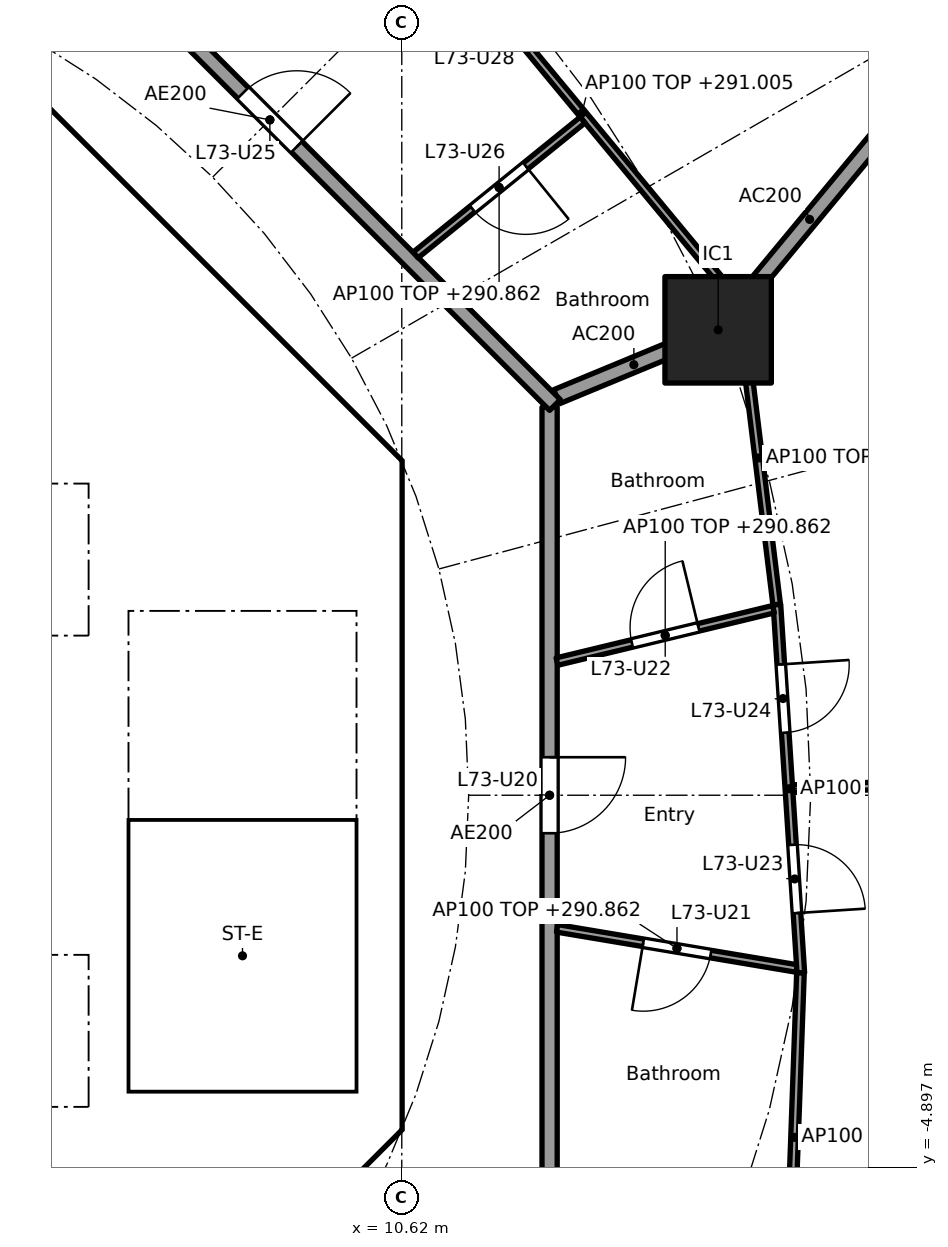
"""IFC4 building model, lengths in metres.
Left out: names, types, materials, properties, quantities, classifications, styles, units other than length and angle.
Written with IfcOpenShell. Run it as: python <this file> out.ifc"""

import sys

from ifc_helpers import new_model, si_unit, direction, frame, frame_2d, origin, origin_2d, place, context, subcontext, project, spatial, polyline, rectangle, outline, extrude, element, fill, save


model = new_model("IFC4")
c1 = context("Model", 3, precision=1e-05, world=origin(), true_north=direction((0.0, 1.0)))
c2 = subcontext(c1, "Body", "Model", "MODEL_VIEW")
j1 = project(units=[si_unit("LENGTHUNIT", "METRE"), si_unit("PLANEANGLEUNIT", "RADIAN")], contexts=[c1])
p1 = place(None, origin())
s1 = spatial("IfcSite", under=j1, at=p1, CompositionType="ELEMENT")
p2 = place(p1, origin())
s2 = spatial("IfcBuilding", under=s1, at=p2, CompositionType="ELEMENT")
p3 = place(p2, frame((0.0, 0.0, 288.1)))
s3 = spatial("IfcBuildingStorey", under=s2, at=p3, CompositionType="ELEMENT", Elevation=288.1)
p4 = place(p3, frame((14.782, 6.123, 0.0), z_axis=(0.0, 0.0, 1.0), x_axis=(1.0, 0.0, 0.0)))
e1 = element("IfcColumn", 1, at=p4, inside=s3, PredefinedType="COLUMN", context=c2, shape_type="SweptSolid", body=[
    extrude(rectangle(XDim=1.4, YDim=1.4, at=origin_2d()), origin(), (0.0, 0.0, 1.0), 3.7),
])
p5 = place(p3, frame((9.988, 4.613, 0.0), z_axis=(0.0, 0.0, 1.0), x_axis=(-0.707106781187, 0.707106781187, 0.0)))
e2 = element("IfcWall", 2, at=p5, inside=s3, PredefinedType="SHEAR", context=c2, shape_type="SweptSolid", body=[
    extrude(rectangle(XDim=7.602, YDim=0.6, at=frame_2d((3.801, 0.0))), origin(), (0.0, 0.0, 1.0), 3.44),
])
p6 = place(p5, frame((3.201, 0.0, 0.0)))
e3 = element("IfcOpeningElement", 3, at=p6, cuts=e2, PredefinedType="OPENING", context=c2, shape_type="SweptSolid", body=[
    extrude(rectangle(XDim=1.2, YDim=2.1, at=frame_2d((0.6, 1.05))), frame((0.0, 0.31, 0.0), z_axis=(0.0, -1.0, 0.0), x_axis=(1.0, 0.0, 0.0)), (0.0, 0.0, 1.0), 0.62),
])
p7 = place(p3, frame((4.613, -9.988, 0.0), z_axis=(0.0, 0.0, 1.0), x_axis=(0.707106781187, 0.707106781187, 0.0)))
e4 = element("IfcWall", 4, at=p7, inside=s3, PredefinedType="SHEAR", context=c2, shape_type="SweptSolid", body=[
    extrude(rectangle(XDim=7.602, YDim=0.6, at=frame_2d((3.801, 0.0))), origin(), (0.0, 0.0, 1.0), 3.44),
])
p8 = place(p7, frame((3.201, 0.0, 0.0)))
e5 = element("IfcOpeningElement", 5, at=p8, cuts=e4, PredefinedType="OPENING", context=c2, shape_type="SweptSolid", body=[
    extrude(rectangle(XDim=1.2, YDim=2.1, at=frame_2d((0.6, 1.05))), frame((0.0, 0.31, 0.0), z_axis=(0.0, -1.0, 0.0), x_axis=(1.0, 0.0, 0.0)), (0.0, 0.0, 1.0), 0.62),
])
p9 = place(p3, frame((-6.7, 2.0, 0.0), z_axis=(0.0, 0.0, 1.0), x_axis=(1.0, 0.0, 0.0)))
e6 = element("IfcWall", 6, at=p9, inside=s3, PredefinedType="SOLIDWALL", context=c2, shape_type="SweptSolid", body=[
    extrude(rectangle(XDim=13.4, YDim=0.2, at=frame_2d((6.7, 0.0))), origin(), (0.0, 0.0, 1.0), 3.44),
])
p10 = place(p9, frame((11.65, 0.0, 0.0)))
e7 = element("IfcOpeningElement", 7, at=p10, cuts=e6, PredefinedType="OPENING", context=c2, shape_type="SweptSolid", body=[
    extrude(rectangle(XDim=1.1, YDim=2.1, at=frame_2d((0.55, 1.05))), frame((0.0, 0.11, 0.0), z_axis=(0.0, -1.0, 0.0), x_axis=(1.0, 0.0, 0.0)), (0.0, 0.0, 1.0), 0.22),
])
p11 = place(p9, frame((2.95, 0.0, 0.0)))
e8 = element("IfcOpeningElement", 8, at=p11, cuts=e6, PredefinedType="OPENING", context=c2, shape_type="SweptSolid", body=[
    extrude(rectangle(XDim=0.9, YDim=2.1, at=frame_2d((0.45, 1.05))), frame((0.0, 0.11, 0.0), z_axis=(0.0, -1.0, 0.0), x_axis=(1.0, 0.0, 0.0)), (0.0, 0.0, 1.0), 0.22),
])
p12 = place(p9, frame((8.45, 0.0, 0.0)))
e9 = element("IfcOpeningElement", 9, at=p12, cuts=e6, PredefinedType="OPENING", context=c2, shape_type="SweptSolid", body=[
    extrude(rectangle(XDim=0.9, YDim=2.1, at=frame_2d((0.45, 1.05))), frame((0.0, 0.11, 0.0), z_axis=(0.0, -1.0, 0.0), x_axis=(1.0, 0.0, 0.0)), (0.0, 0.0, 1.0), 0.22),
])
p13 = place(p3, frame((6.7, 4.0, 0.0), z_axis=(0.0, 0.0, 1.0), x_axis=(1.0, 0.0, 0.0)))
e10 = element("IfcWall", 10, at=p13, inside=s3, PredefinedType="SOLIDWALL", context=c2, shape_type="SweptSolid", body=[
    extrude(rectangle(XDim=3.325, YDim=0.2, at=frame_2d((1.662, 0.0))), origin(), (0.0, 0.0, 1.0), 3.44),
])
p14 = place(p13, frame((1.25, 0.0, 0.0)))
e11 = element("IfcOpeningElement", 11, at=p14, cuts=e10, PredefinedType="OPENING", context=c2, shape_type="SweptSolid", body=[
    extrude(rectangle(XDim=1.1, YDim=2.1, at=frame_2d((0.55, 1.05))), frame((0.0, 0.11, 0.0), z_axis=(0.0, -1.0, 0.0), x_axis=(1.0, 0.0, 0.0)), (0.0, 0.0, 1.0), 0.22),
])
p15 = place(p3, frame((-6.7, -2.0, 0.0), z_axis=(0.0, 0.0, 1.0), x_axis=(1.0, 0.0, 0.0)))
e12 = element("IfcWall", 12, at=p15, inside=s3, PredefinedType="SOLIDWALL", context=c2, shape_type="SweptSolid", body=[
    extrude(rectangle(XDim=13.4, YDim=0.2, at=frame_2d((6.7, 0.0))), origin(), (0.0, 0.0, 1.0), 3.44),
])
p16 = place(p15, frame((9.45, 0.0, 0.0)))
e13 = element("IfcOpeningElement", 13, at=p16, cuts=e12, PredefinedType="OPENING", context=c2, shape_type="SweptSolid", body=[
    extrude(rectangle(XDim=1.1, YDim=2.1, at=frame_2d((0.55, 1.05))), frame((0.0, 0.11, 0.0), z_axis=(0.0, -1.0, 0.0), x_axis=(1.0, 0.0, 0.0)), (0.0, 0.0, 1.0), 0.22),
])
p17 = place(p15, frame((11.65, 0.0, 0.0)))
e14 = element("IfcOpeningElement", 14, at=p17, cuts=e12, PredefinedType="OPENING", context=c2, shape_type="SweptSolid", body=[
    extrude(rectangle(XDim=1.1, YDim=2.1, at=frame_2d((0.55, 1.05))), frame((0.0, 0.11, 0.0), z_axis=(0.0, -1.0, 0.0), x_axis=(1.0, 0.0, 0.0)), (0.0, 0.0, 1.0), 0.22),
])
p18 = place(p15, frame((0.75, 0.0, 0.0)))
e15 = element("IfcOpeningElement", 15, at=p18, cuts=e12, PredefinedType="OPENING", context=c2, shape_type="SweptSolid", body=[
    extrude(rectangle(XDim=0.9, YDim=2.1, at=frame_2d((0.45, 1.05))), frame((0.0, 0.11, 0.0), z_axis=(0.0, -1.0, 0.0), x_axis=(1.0, 0.0, 0.0)), (0.0, 0.0, 1.0), 0.22),
])
p19 = place(p15, frame((2.95, 0.0, 0.0)))
e16 = element("IfcOpeningElement", 16, at=p19, cuts=e12, PredefinedType="OPENING", context=c2, shape_type="SweptSolid", body=[
    extrude(rectangle(XDim=0.9, YDim=2.1, at=frame_2d((0.45, 1.05))), frame((0.0, 0.11, 0.0), z_axis=(0.0, -1.0, 0.0), x_axis=(1.0, 0.0, 0.0)), (0.0, 0.0, 1.0), 0.22),
])
p20 = place(p15, frame((6.25, 0.0, 0.0)))
e17 = element("IfcOpeningElement", 17, at=p20, cuts=e12, PredefinedType="OPENING", context=c2, shape_type="SweptSolid", body=[
    extrude(rectangle(XDim=0.9, YDim=2.1, at=frame_2d((0.45, 1.05))), frame((0.0, 0.11, 0.0), z_axis=(0.0, -1.0, 0.0), x_axis=(1.0, 0.0, 0.0)), (0.0, 0.0, 1.0), 0.22),
])
p21 = place(p3, origin())
e18 = element("IfcWall", 18, at=p21, inside=s3, PredefinedType="SHEAR", context=c2, shape_type="SweptSolid", body=[
    extrude(outline(polyline([(9.776, -4.401), (10.025, -4.152), (10.025, -3.801), (10.025, 4.152), (9.776, 4.401), (10.2, 4.825), (10.625, 4.401), (10.625, -4.401), (10.2, -4.825), (9.776, -4.401)])), origin(), (0.0, 0.0, 1.0), 3.44),
])
p22 = place(p3, origin())
e19 = element("IfcWall", 19, at=p22, inside=s3, PredefinedType="SOLIDWALL", context=c2, shape_type="SweptSolid", body=[
    extrude(outline(polyline([(-6.7, -2.1), (-6.5, -2.1), (-6.5, -4.1), (-4.5, -4.1), (-4.5, -2.1), (-4.3, -2.1), (-4.3, -4.1), (-2.3, -4.1), (-2.3, -2.1), (-2.1, -2.1), (-2.1, -4.1), (2.1, -4.1), (2.1, -2.1), (2.3, -2.1), (2.3, -4.1), (4.3, -4.1), (4.3, -2.1), (4.5, -2.1), (4.5, -4.1), (6.5, -4.1), (6.5, -2.1), (6.7, -2.1), (6.7, -4.3), (-6.7, -4.3), (-6.7, -2.1)])), origin(), (0.0, 0.0, 1.0), 3.44),
])
p23 = place(p3, origin())
e20 = element("IfcWall", 20, at=p23, inside=s3, PredefinedType="SOLIDWALL", context=c2, shape_type="SweptSolid", body=[
    extrude(outline(polyline([(-6.7, 4.3), (6.7, 4.3), (6.7, 2.1), (6.5, 2.1), (6.5, 4.1), (4.5, 4.1), (4.5, 2.1), (4.3, 2.1), (4.3, 4.1), (0.1, 4.1), (0.1, 2.1), (-0.1, 2.1), (-0.1, 4.1), (-6.5, 4.1), (-6.5, 2.1), (-6.7, 2.1), (-6.7, 4.3)])), origin(), (0.0, 0.0, 1.0), 3.44),
])
p24 = place(p3, origin())
e21 = element("IfcWall", 21, at=p24, inside=s3, PredefinedType="SOLIDWALL", context=c2, shape_type="SweptSolid", body=[
    extrude(outline(polyline([(7.025, -3.9), (6.7, -3.9), (6.7, 3.9), (7.025, 3.9), (7.025, -3.9)])), origin(), (0.0, 0.0, 1.0), 3.44),
])
p25 = place(p3, origin())
e22 = element("IfcWall", 22, at=p25, inside=s3, PredefinedType="SOLIDWALL", context=c2, shape_type="SweptSolid", body=[
    extrude(outline(polyline([(10.025, -4.1), (6.7, -4.1), (6.7, -3.9), (10.025, -3.9), (10.025, -4.1)])), origin(), (0.0, 0.0, 1.0), 3.44),
])
p26 = place(p3, frame((12.657, 5.243, 0.0), z_axis=(0.0, 0.0, 1.0), x_axis=(0.923853160736, 0.382747093259, 0.0)))
e23 = element("IfcWall", 23, at=p26, inside=s3, PredefinedType="PARTITIONING", context=c2, shape_type="SweptSolid", body=[
    extrude(rectangle(XDim=2.2, YDim=0.2, at=frame_2d((1.1, 0.0))), origin(), (0.0, 0.0, 1.0), 3.44),
])
p27 = place(p3, frame((14.814, 6.161, 0.0), z_axis=(0.0, 0.0, 1.0), x_axis=(0.638050520313, 0.769994502272, 0.0)))
e24 = element("IfcWall", 24, at=p27, inside=s3, PredefinedType="PARTITIONING", context=c2, shape_type="SweptSolid", body=[
    extrude(rectangle(XDim=3.673, YDim=0.2, at=frame_2d((1.836, 0.0))), origin(), (0.0, 0.0, 1.0), 3.44),
])
p28 = place(p3, frame((12.565, -5.104, 0.0), z_axis=(0.0, 0.0, 1.0), x_axis=(0.0, 1.0, 0.0)))
e25 = element("IfcWall", 25, at=p28, inside=s3, PredefinedType="PARTITIONING", context=c2, shape_type="SweptSolid", body=[
    extrude(rectangle(XDim=10.209, YDim=0.2, at=frame_2d((5.104, 0.0))), origin(), (0.0, 0.0, 1.0), 3.44),
])
p29 = place(p28, frame((4.604, 0.0, 0.0)))
e26 = element("IfcOpeningElement", 26, at=p29, cuts=e25, PredefinedType="OPENING", context=c2, shape_type="SweptSolid", body=[
    extrude(rectangle(XDim=1.0, YDim=2.1, at=frame_2d((0.5, 1.05))), frame((0.0, 0.11, 0.0), z_axis=(0.0, -1.0, 0.0), x_axis=(1.0, 0.0, 0.0)), (0.0, 0.0, 1.0), 0.22),
])
p30 = place(p3, frame((12.635, 5.134, 0.0), z_axis=(0.0, 0.0, 1.0), x_axis=(-0.707106781187, 0.707106781187, 0.0)))
e27 = element("IfcWall", 27, at=p30, inside=s3, PredefinedType="PARTITIONING", context=c2, shape_type="SweptSolid", body=[
    extrude(rectangle(XDim=10.609, YDim=0.2, at=frame_2d((5.305, 0.0))), origin(), (0.0, 0.0, 1.0), 3.44),
])
p31 = place(p30, frame((4.804, 0.0, 0.0)))
e28 = element("IfcOpeningElement", 28, at=p31, cuts=e27, PredefinedType="OPENING", context=c2, shape_type="SweptSolid", body=[
    extrude(rectangle(XDim=1.0, YDim=2.1, at=frame_2d((0.5, 1.05))), frame((0.0, 0.11, 0.0), z_axis=(0.0, -1.0, 0.0), x_axis=(1.0, 0.0, 0.0)), (0.0, 0.0, 1.0), 0.22),
])
p32 = place(p3, frame((12.663, -1.751, 0.0), z_axis=(0.0, 0.0, 1.0), x_axis=(0.98626156497, -0.165191178529, 0.0)))
e29 = element("IfcWall", 29, at=p32, inside=s3, PredefinedType="PARTITIONING", context=c2, shape_type="SweptSolid", body=[
    extrude(rectangle(XDim=3.198, YDim=0.1, at=frame_2d((1.599, 0.0))), origin(), (0.0, 0.0, 1.0), 2.762),
])
p33 = place(p32, frame((1.149, 0.0, 0.0)))
e30 = element("IfcOpeningElement", 30, at=p33, cuts=e29, PredefinedType="OPENING", context=c2, shape_type="SweptSolid", body=[
    extrude(rectangle(XDim=0.9, YDim=2.1, at=frame_2d((0.45, 1.05))), frame((0.0, 0.06, 0.0), z_axis=(0.0, -1.0, 0.0), x_axis=(1.0, 0.0, 0.0)), (0.0, 0.0, 1.0), 0.12),
])
p34 = place(p3, frame((15.87, -2.338, 0.0), z_axis=(0.0, 0.0, 1.0), x_axis=(-0.064797294757, 0.997898447034, 0.0)))
e31 = element("IfcWall", 31, at=p34, inside=s3, PredefinedType="PARTITIONING", context=c2, shape_type="SweptSolid", body=[
    extrude(rectangle(XDim=4.857, YDim=0.1, at=frame_2d((2.428, 0.0))), origin(), (0.0, 0.0, 1.0), 3.44),
])
p35 = place(p34, frame((0.789, 0.0, 0.0)))
e32 = element("IfcOpeningElement", 32, at=p35, cuts=e31, PredefinedType="OPENING", context=c2, shape_type="SweptSolid", body=[
    extrude(rectangle(XDim=0.9, YDim=2.1, at=frame_2d((0.45, 1.05))), frame((0.0, 0.06, 0.0), z_axis=(0.0, -1.0, 0.0), x_axis=(1.0, 0.0, 0.0)), (0.0, 0.0, 1.0), 0.12),
])
p36 = place(p34, frame((3.167, 0.0, 0.0)))
e33 = element("IfcOpeningElement", 33, at=p36, cuts=e31, PredefinedType="OPENING", context=c2, shape_type="SweptSolid", body=[
    extrude(rectangle(XDim=0.9, YDim=2.1, at=frame_2d((0.45, 1.05))), frame((0.0, 0.06, 0.0), z_axis=(0.0, -1.0, 0.0), x_axis=(1.0, 0.0, 0.0)), (0.0, 0.0, 1.0), 0.12),
])
p37 = place(p3, frame((15.865, -2.338, 0.0), z_axis=(0.0, 0.0, 1.0), x_axis=(-0.035864509465, -0.999356661538, 0.0)))
e34 = element("IfcWall", 34, at=p37, inside=s3, PredefinedType="PARTITIONING", context=c2, shape_type="SweptSolid", body=[
    extrude(rectangle(XDim=4.329, YDim=0.1, at=frame_2d((2.165, 0.0))), origin(), (0.0, 0.0, 1.0), 2.905),
])
p38 = place(p3, frame((15.763, 0.087, 0.0), z_axis=(0.0, 0.0, 1.0), x_axis=(0.999492034598, 0.03186962151, 0.0)))
e35 = element("IfcWall", 35, at=p38, inside=s3, PredefinedType="PARTITIONING", context=c2, shape_type="SweptSolid", body=[
    extrude(rectangle(XDim=4.826, YDim=0.1, at=frame_2d((2.413, 0.0))), origin(), (0.0, 0.0, 1.0), 2.983),
])
p39 = place(p3, frame((12.662, 1.758, 0.0), z_axis=(0.0, 0.0, 1.0), x_axis=(0.972004827836, 0.234960879007, 0.0)))
e36 = element("IfcWall", 36, at=p39, inside=s3, PredefinedType="PARTITIONING", context=c2, shape_type="SweptSolid", body=[
    extrude(rectangle(XDim=2.93, YDim=0.1, at=frame_2d((1.465, 0.0))), origin(), (0.0, 0.0, 1.0), 2.762),
])
p40 = place(p39, frame((1.015, 0.0, 0.0)))
e37 = element("IfcOpeningElement", 37, at=p40, cuts=e36, PredefinedType="OPENING", context=c2, shape_type="SweptSolid", body=[
    extrude(rectangle(XDim=0.9, YDim=2.1, at=frame_2d((0.45, 1.05))), frame((0.0, 0.06, 0.0), z_axis=(0.0, -1.0, 0.0), x_axis=(1.0, 0.0, 0.0)), (0.0, 0.0, 1.0), 0.12),
])
p41 = place(p3, frame((15.552, 2.508, 0.0), z_axis=(0.0, 0.0, 1.0), x_axis=(-0.12196293976, 0.992534654974, 0.0)))
e38 = element("IfcWall", 38, at=p41, inside=s3, PredefinedType="PARTITIONING", context=c2, shape_type="SweptSolid", body=[
    extrude(rectangle(XDim=3.887, YDim=0.1, at=frame_2d((1.944, 0.0))), origin(), (0.0, 0.0, 1.0), 2.905),
])
p42 = place(p3, frame((15.002, 6.543, 0.0), z_axis=(0.0, 0.0, 1.0), x_axis=(-0.637932656528, 0.770092154054, 0.0)))
e39 = element("IfcWall", 39, at=p42, inside=s3, PredefinedType="PARTITIONING", context=c2, shape_type="SweptSolid", body=[
    extrude(rectangle(XDim=6.311, YDim=0.1, at=frame_2d((3.155, 0.0))), origin(), (0.0, 0.0, 1.0), 2.905),
])
p43 = place(p42, frame((4.22, 0.0, 0.0)))
e40 = element("IfcOpeningElement", 40, at=p43, cuts=e39, PredefinedType="OPENING", context=c2, shape_type="SweptSolid", body=[
    extrude(rectangle(XDim=0.9, YDim=2.1, at=frame_2d((0.45, 1.05))), frame((0.0, 0.06, 0.0), z_axis=(0.0, -1.0, 0.0), x_axis=(1.0, 0.0, 0.0)), (0.0, 0.0, 1.0), 0.12),
])
p44 = place(p3, frame((10.802, 7.107, 0.0), z_axis=(0.0, 0.0, 1.0), x_axis=(0.777526610395, 0.628850037868, 0.0)))
e41 = element("IfcWall", 41, at=p44, inside=s3, PredefinedType="PARTITIONING", context=c2, shape_type="SweptSolid", body=[
    extrude(rectangle(XDim=2.824, YDim=0.1, at=frame_2d((1.412, 0.0))), origin(), (0.0, 0.0, 1.0), 2.762),
])
p45 = place(p44, frame((0.962, 0.0, 0.0)))
e42 = element("IfcOpeningElement", 42, at=p45, cuts=e41, PredefinedType="OPENING", context=c2, shape_type="SweptSolid", body=[
    extrude(rectangle(XDim=0.9, YDim=2.1, at=frame_2d((0.45, 1.05))), frame((0.0, 0.06, 0.0), z_axis=(0.0, -1.0, 0.0), x_axis=(1.0, 0.0, 0.0)), (0.0, 0.0, 1.0), 0.12),
])
p46 = place(p10, origin())
e43 = element("IfcDoor", 43, at=p46, inside=s3, OperationType="DOUBLE_DOOR_SLIDING", PredefinedType="DOOR", context=c2, shape_type="SweptSolid", body=[
    extrude(rectangle(XDim=1.1, YDim=2.1, at=frame_2d((0.55, 1.05))), frame((0.0, 0.025, 0.0), z_axis=(0.0, -1.0, 0.0), x_axis=(1.0, 0.0, 0.0)), (0.0, 0.0, 1.0), 0.05),
])
fill(e7, e43)
p47 = place(p17, origin())
e44 = element("IfcDoor", 44, at=p47, inside=s3, OperationType="DOUBLE_DOOR_SLIDING", PredefinedType="DOOR", context=c2, shape_type="SweptSolid", body=[
    extrude(rectangle(XDim=1.1, YDim=2.1, at=frame_2d((0.55, 1.05))), frame((0.0, 0.025, 0.0), z_axis=(0.0, -1.0, 0.0), x_axis=(1.0, 0.0, 0.0)), (0.0, 0.0, 1.0), 0.05),
])
fill(e14, e44)
p48 = place(p14, frame((1.1, 0.0, 0.0), x_axis=(-1.0, 0.0, 0.0)))
e45 = element("IfcDoor", 45, at=p48, inside=s3, OperationType="SINGLE_SWING_RIGHT", PredefinedType="DOOR", context=c2, shape_type="SweptSolid", body=[
    extrude(rectangle(XDim=1.1, YDim=2.1, at=frame_2d((0.55, 1.05))), frame((0.0, 0.025, 0.0), z_axis=(0.0, -1.0, 0.0), x_axis=(1.0, 0.0, 0.0)), (0.0, 0.0, 1.0), 0.05),
])
fill(e11, e45)
p49 = place(p6, origin())
e46 = element("IfcDoor", 46, at=p49, inside=s3, OperationType="SINGLE_SWING_LEFT", PredefinedType="DOOR", context=c2, shape_type="SweptSolid", body=[
    extrude(rectangle(XDim=1.2, YDim=2.1, at=frame_2d((0.6, 1.05))), frame((0.0, 0.025, 0.0), z_axis=(0.0, -1.0, 0.0), x_axis=(1.0, 0.0, 0.0)), (0.0, 0.0, 1.0), 0.05),
])
fill(e3, e46)
p50 = place(p29, frame((1.0, 0.0, 0.0), x_axis=(-1.0, 0.0, 0.0)))
e47 = element("IfcDoor", 47, at=p50, inside=s3, OperationType="SINGLE_SWING_LEFT", PredefinedType="DOOR", context=c2, shape_type="SweptSolid", body=[
    extrude(rectangle(XDim=1.0, YDim=2.1, at=frame_2d((0.5, 1.05))), frame((0.0, 0.025, 0.0), z_axis=(0.0, -1.0, 0.0), x_axis=(1.0, 0.0, 0.0)), (0.0, 0.0, 1.0), 0.05),
])
fill(e26, e47)
p51 = place(p33, frame((0.9, 0.0, 0.0), x_axis=(-1.0, 0.0, 0.0)))
e48 = element("IfcDoor", 48, at=p51, inside=s3, OperationType="SINGLE_SWING_RIGHT", PredefinedType="DOOR", context=c2, shape_type="SweptSolid", body=[
    extrude(rectangle(XDim=0.9, YDim=2.1, at=frame_2d((0.45, 1.05))), frame((0.0, 0.025, 0.0), z_axis=(0.0, -1.0, 0.0), x_axis=(1.0, 0.0, 0.0)), (0.0, 0.0, 1.0), 0.05),
])
fill(e30, e48)
p52 = place(p40, origin())
e49 = element("IfcDoor", 49, at=p52, inside=s3, OperationType="SINGLE_SWING_RIGHT", PredefinedType="DOOR", context=c2, shape_type="SweptSolid", body=[
    extrude(rectangle(XDim=0.9, YDim=2.1, at=frame_2d((0.45, 1.05))), frame((0.0, 0.025, 0.0), z_axis=(0.0, -1.0, 0.0), x_axis=(1.0, 0.0, 0.0)), (0.0, 0.0, 1.0), 0.05),
])
fill(e37, e49)
p53 = place(p35, frame((0.9, 0.0, 0.0), x_axis=(-1.0, 0.0, 0.0)))
e50 = element("IfcDoor", 50, at=p53, inside=s3, OperationType="SINGLE_SWING_RIGHT", PredefinedType="DOOR", context=c2, shape_type="SweptSolid", body=[
    extrude(rectangle(XDim=0.9, YDim=2.1, at=frame_2d((0.45, 1.05))), frame((0.0, 0.025, 0.0), z_axis=(0.0, -1.0, 0.0), x_axis=(1.0, 0.0, 0.0)), (0.0, 0.0, 1.0), 0.05),
])
fill(e32, e50)
p54 = place(p36, frame((0.9, 0.0, 0.0), x_axis=(-1.0, 0.0, 0.0)))
e51 = element("IfcDoor", 51, at=p54, inside=s3, OperationType="SINGLE_SWING_LEFT", PredefinedType="DOOR", context=c2, shape_type="SweptSolid", body=[
    extrude(rectangle(XDim=0.9, YDim=2.1, at=frame_2d((0.45, 1.05))), frame((0.0, 0.025, 0.0), z_axis=(0.0, -1.0, 0.0), x_axis=(1.0, 0.0, 0.0)), (0.0, 0.0, 1.0), 0.05),
])
fill(e33, e51)
p55 = place(p31, frame((1.0, 0.0, 0.0), x_axis=(-1.0, 0.0, 0.0)))
e52 = element("IfcDoor", 52, at=p55, inside=s3, OperationType="SINGLE_SWING_RIGHT", PredefinedType="DOOR", context=c2, shape_type="SweptSolid", body=[
    extrude(rectangle(XDim=1.0, YDim=2.1, at=frame_2d((0.5, 1.05))), frame((0.0, 0.025, 0.0), z_axis=(0.0, -1.0, 0.0), x_axis=(1.0, 0.0, 0.0)), (0.0, 0.0, 1.0), 0.05),
])
fill(e28, e52)
p56 = place(p45, frame((0.9, 0.0, 0.0), x_axis=(-1.0, 0.0, 0.0)))
e53 = element("IfcDoor", 53, at=p56, inside=s3, OperationType="SINGLE_SWING_LEFT", PredefinedType="DOOR", context=c2, shape_type="SweptSolid", body=[
    extrude(rectangle(XDim=0.9, YDim=2.1, at=frame_2d((0.45, 1.05))), frame((0.0, 0.025, 0.0), z_axis=(0.0, -1.0, 0.0), x_axis=(1.0, 0.0, 0.0)), (0.0, 0.0, 1.0), 0.05),
])
fill(e42, e53)
save(model, sys.argv[1])
